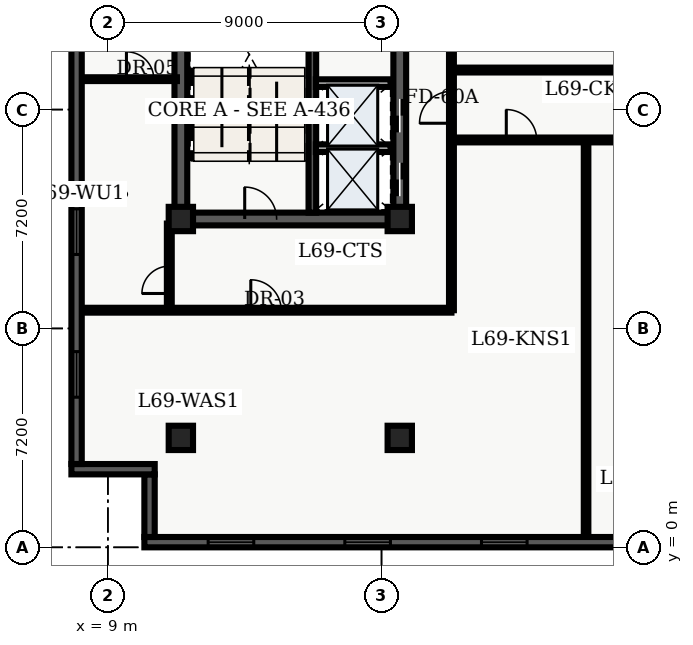
"""IFC4 building model, lengths in metres.
Left out: names, types, materials, properties, quantities, classifications, styles, units other than length and angle.
Written with IfcOpenShell. Run it as: python <this file> out.ifc"""

import sys

from ifc_helpers import new_model, entity, si_unit, converted_unit, direction, frame, origin_with_axes, origin_2d_with_axis, place, context, subcontext, project, spatial, polyline, rectangle, outline, extrude, element, fill, save


model = new_model("IFC4")
c1 = context("Model", 3, precision=1e-05, world=origin_with_axes(), true_north=direction((0.0, 1.0)))
c2 = subcontext(c1, "Body", "Model", "MODEL_VIEW")
j1 = project(units=[si_unit("LENGTHUNIT", "METRE"), converted_unit("PLANEANGLEUNIT", "DEGREE", entity("IfcPlaneAngleMeasure", 0.017), si_unit("PLANEANGLEUNIT", "RADIAN"), dimensions=[0, 0, 0, 0, 0, 0, 0])], contexts=[c1])
p1 = place(None, origin_with_axes())
s1 = spatial("IfcSite", under=j1, at=p1, CompositionType="ELEMENT")
p2 = place(p1, origin_with_axes())
s2 = spatial("IfcBuilding", under=s1, at=p2, CompositionType="ELEMENT")
p3 = place(p2, frame((0.0, 0.0, 280.2), z_axis=(0.0, 0.0, 1.0), x_axis=(1.0, 0.0, 0.0)))
s3 = spatial("IfcBuildingStorey", under=s2, at=p3, CompositionType="ELEMENT", Elevation=280.2)
p4 = place(p3, frame((11.4, 10.8, 0.0), z_axis=(0.0, 0.0, 1.0), x_axis=(0.0, 1.0, 0.0)))
e1 = element("IfcWall", 1, at=p4, inside=s3, PredefinedType="SHEAR", context=c2, shape_type="SweptSolid", body=[
    extrude(outline(polyline([(0.0, -0.21), (27.0, -0.21), (27.0, 0.21), (0.0, 0.21), (0.0, -0.21)])), origin_with_axes(), (0.0, 0.0, 1.0), 3.66),
])
p5 = place(p3, frame((11.4, 10.8, 0.0), z_axis=(0.0, 0.0, 1.0), x_axis=(1.0, 0.0, 0.0)))
e2 = element("IfcWall", 2, at=p5, inside=s3, PredefinedType="SHEAR", context=c2, shape_type="SweptSolid", body=[
    extrude(outline(polyline([(0.0, -0.21), (7.2, -0.21), (7.2, 0.21), (0.0, 0.21), (0.0, -0.21)])), origin_with_axes(), (0.0, 0.0, 1.0), 3.66),
])
p6 = place(p5, frame((2.625, 0.0, 0.0), z_axis=(0.0, 0.0, 1.0), x_axis=(1.0, 0.0, 0.0)))
e3 = element("IfcOpeningElement", 3, at=p6, cuts=e2, PredefinedType="OPENING", context=c2, shape_type="SweptSolid", body=[
    extrude(rectangle(XDim=1.05, YDim=0.44, at=origin_2d_with_axis()), origin_with_axes(), (0.0, 0.0, 1.0), 2.15),
])
p7 = place(p3, frame((18.6, 10.8, 0.0), z_axis=(0.0, 0.0, 1.0), x_axis=(0.0, 1.0, 0.0)))
e4 = element("IfcWall", 4, at=p7, inside=s3, PredefinedType="SHEAR", context=c2, shape_type="SweptSolid", body=[
    extrude(outline(polyline([(0.0, -0.21), (13.5, -0.21), (13.5, 0.21), (0.0, 0.21), (0.0, -0.21)])), origin_with_axes(), (0.0, 0.0, 1.0), 3.66),
])
p8 = place(p7, frame((1.3, 0.0, 0.0), z_axis=(0.0, 0.0, 1.0), x_axis=(1.0, 0.0, 0.0)))
e5 = element("IfcOpeningElement", 5, at=p8, cuts=e4, PredefinedType="OPENING", context=c2, shape_type="SweptSolid", body=[
    extrude(rectangle(XDim=1.1, YDim=0.44, at=origin_2d_with_axis()), origin_with_axes(), (0.0, 0.0, 1.0), 2.15),
])
p9 = place(p7, frame((3.4, 0.0, 0.0), z_axis=(0.0, 0.0, 1.0), x_axis=(1.0, 0.0, 0.0)))
e6 = element("IfcOpeningElement", 6, at=p9, cuts=e4, PredefinedType="OPENING", context=c2, shape_type="SweptSolid", body=[
    extrude(rectangle(XDim=1.1, YDim=0.44, at=origin_2d_with_axis()), origin_with_axes(), (0.0, 0.0, 1.0), 2.15),
])
p10 = place(p7, frame((11.125, 0.0, 0.0), z_axis=(0.0, 0.0, 1.0), x_axis=(1.0, 0.0, 0.0)))
e7 = element("IfcOpeningElement", 7, at=p10, cuts=e4, PredefinedType="OPENING", context=c2, shape_type="SweptSolid", body=[
    extrude(rectangle(XDim=1.05, YDim=0.44, at=origin_2d_with_axis()), origin_with_axes(), (0.0, 0.0, 1.0), 2.15),
])
p11 = place(p7, frame((6.675, 0.0, 0.0), z_axis=(0.0, 0.0, 1.0), x_axis=(1.0, 0.0, 0.0)))
e8 = element("IfcOpeningElement", 8, at=p11, cuts=e4, PredefinedType="OPENING", context=c2, shape_type="SweptSolid", body=[
    extrude(rectangle(XDim=0.95, YDim=0.44, at=origin_2d_with_axis()), origin_with_axes(), (0.0, 0.0, 1.0), 2.15),
])
p12 = place(p3, frame((15.725, 11.01, 0.0), z_axis=(0.0, 0.0, 1.0), x_axis=(0.0, 1.0, 0.0)))
e9 = element("IfcWall", 9, at=p12, inside=s3, PredefinedType="SHEAR", context=c2, shape_type="SweptSolid", body=[
    extrude(outline(polyline([(0.0, -0.125), (8.69, -0.125), (8.69, 0.125), (0.0, 0.125), (0.0, -0.125)])), origin_with_axes(), (0.0, 0.0, 1.0), 3.66),
])
for number, where, z_axis, x_axis in (
    (10, (11.4, 3.6, 0.0), (0.0, 0.0, 1.0), (1.0, 0.0, 0.0)),
    (11, (11.4, 10.8, 0.0), (0.0, 0.0, 1.0), (1.0, 0.0, 0.0)),
    (12, (18.6, 3.6, 0.0), (0.0, 0.0, 1.0), (1.0, 0.0, 0.0)),
    (13, (18.6, 10.8, 0.0), (0.0, 0.0, 1.0), (1.0, 0.0, 0.0)),
):
    element("IfcColumn", number, at=place(p3, frame(where, z_axis=z_axis, x_axis=x_axis)), inside=s3, PredefinedType="COLUMN", context=c2, shape_type="SweptSolid", body=[
        extrude(rectangle(XDim=0.8, YDim=0.8, at=origin_2d_with_axis()), origin_with_axes(), (0.0, 0.0, 1.0), 3.9),
    ])
for number, where, z_axis, x_axis in (
    (14, (15.84, 13.13, 0.0), (0.0, 0.0, 1.0), (1.0, 0.0, 0.0)),
    (15, (15.84, 15.27, 0.0), (0.0, 0.0, 1.0), (1.0, 0.0, 0.0)),
):
    element("IfcWall", number, at=place(p3, frame(where, z_axis=z_axis, x_axis=x_axis)), inside=s3, PredefinedType="SOLIDWALL", context=c2, shape_type="SweptSolid", body=[
        extrude(outline(polyline([(0.0, -0.125), (2.46, -0.125), (2.46, 0.125), (0.0, 0.125), (0.0, -0.125)])), origin_with_axes(), (0.0, 0.0, 1.0), 2.7),
    ])
p13 = place(p3, frame((8.135, 7.8, 0.0), z_axis=(0.0, 0.0, 1.0), x_axis=(1.0, 0.0, 0.0)))
e16 = element("IfcWall", 16, at=p13, inside=s3, PredefinedType="PARTITIONING", context=c2, shape_type="SweptSolid", body=[
    extrude(outline(polyline([(0.0, -0.08), (12.165, -0.08), (12.165, 0.08), (0.0, 0.08), (0.0, -0.08)])), origin_with_axes(), (0.0, 0.0, 1.0), 2.7),
])
p14 = place(p13, frame((6.065, 0.0, 0.0), z_axis=(0.0, 0.0, 1.0), x_axis=(1.0, 0.0, 0.0)))
e17 = element("IfcOpeningElement", 17, at=p14, cuts=e16, PredefinedType="OPENING", context=c2, shape_type="SweptSolid", body=[
    extrude(rectangle(XDim=1.0, YDim=0.18, at=origin_2d_with_axis()), origin_with_axes(), (0.0, 0.0, 1.0), 2.15),
])
p15 = place(p3, frame((20.3, 7.8, 0.0), z_axis=(0.0, 0.0, 1.0), x_axis=(0.0, 1.0, 0.0)))
e18 = element("IfcWall", 18, at=p15, inside=s3, PredefinedType="PARTITIONING", context=c2, shape_type="SweptSolid", body=[
    extrude(outline(polyline([(0.0, -0.08), (32.7, -0.08), (32.7, 0.08), (0.0, 0.08), (0.0, -0.08)])), origin_with_axes(), (0.0, 0.0, 1.0), 2.7),
])
p16 = place(p15, frame((14.2, 0.0, 0.0), z_axis=(0.0, 0.0, 1.0), x_axis=(1.0, 0.0, 0.0)))
e19 = element("IfcOpeningElement", 19, at=p16, cuts=e18, PredefinedType="OPENING", context=c2, shape_type="SweptSolid", body=[
    extrude(rectangle(XDim=1.0, YDim=0.18, at=origin_2d_with_axis()), origin_with_axes(), (0.0, 0.0, 1.0), 2.15),
])
p17 = place(p15, frame((18.24, 0.0, 0.0), z_axis=(0.0, 0.0, 1.0), x_axis=(1.0, 0.0, 0.0)))
e20 = element("IfcOpeningElement", 20, at=p17, cuts=e18, PredefinedType="OPENING", context=c2, shape_type="SweptSolid", body=[
    extrude(rectangle(XDim=1.0, YDim=0.18, at=origin_2d_with_axis()), origin_with_axes(), (0.0, 0.0, 1.0), 2.15),
])
p18 = place(p15, frame((22.011, 0.0, 0.0), z_axis=(0.0, 0.0, 1.0), x_axis=(1.0, 0.0, 0.0)))
e21 = element("IfcOpeningElement", 21, at=p18, cuts=e18, PredefinedType="OPENING", context=c2, shape_type="SweptSolid", body=[
    extrude(rectangle(XDim=1.0, YDim=0.18, at=origin_2d_with_axis()), origin_with_axes(), (0.0, 0.0, 1.0), 2.15),
])
p19 = place(p15, frame((25.672, 0.0, 0.0), z_axis=(0.0, 0.0, 1.0), x_axis=(1.0, 0.0, 0.0)))
e22 = element("IfcOpeningElement", 22, at=p19, cuts=e18, PredefinedType="OPENING", context=c2, shape_type="SweptSolid", body=[
    extrude(rectangle(XDim=1.0, YDim=0.18, at=origin_2d_with_axis()), origin_with_axes(), (0.0, 0.0, 1.0), 2.15),
])
p20 = place(p15, frame((6.675, 0.0, 0.0), z_axis=(0.0, 0.0, 1.0), x_axis=(1.0, 0.0, 0.0)))
e23 = element("IfcOpeningElement", 23, at=p20, cuts=e18, PredefinedType="OPENING", context=c2, shape_type="SweptSolid", body=[
    extrude(rectangle(XDim=1.05, YDim=0.18, at=origin_2d_with_axis()), origin_with_axes(), (0.0, 0.0, 1.0), 2.15),
])
p21 = place(p3, frame((11.02, 7.8, 0.0), z_axis=(0.0, 0.0, 1.0), x_axis=(0.0, 1.0, 0.0)))
e24 = element("IfcWall", 24, at=p21, inside=s3, PredefinedType="PARTITIONING", context=c2, shape_type="SweptSolid", body=[
    extrude(outline(polyline([(0.0, -0.08), (2.85, -0.08), (2.85, 0.08), (0.0, 0.08), (0.0, -0.08)])), origin_with_axes(), (0.0, 0.0, 1.0), 2.7),
])
p22 = place(p21, frame((1.0, 0.0, 0.0), z_axis=(0.0, 0.0, 1.0), x_axis=(1.0, 0.0, 0.0)))
e25 = element("IfcOpeningElement", 25, at=p22, cuts=e24, PredefinedType="OPENING", context=c2, shape_type="SweptSolid", body=[
    extrude(rectangle(XDim=0.9, YDim=0.18, at=origin_2d_with_axis()), origin_with_axes(), (0.0, 0.0, 1.0), 2.15),
])
p23 = place(p3, frame((8.135, 15.4, 0.0), z_axis=(0.0, 0.0, 1.0), x_axis=(1.0, 0.0, 0.0)))
e26 = element("IfcWall", 26, at=p23, inside=s3, PredefinedType="PARTITIONING", context=c2, shape_type="SweptSolid", body=[
    extrude(outline(polyline([(0.0, -0.062), (3.135, -0.062), (3.135, 0.062), (0.0, 0.062), (0.0, -0.062)])), origin_with_axes(), (0.0, 0.0, 1.0), 2.7),
])
p24 = place(p23, frame((1.925, 0.0, 0.0), z_axis=(0.0, 0.0, 1.0), x_axis=(1.0, 0.0, 0.0)))
e27 = element("IfcOpeningElement", 27, at=p24, cuts=e26, PredefinedType="OPENING", context=c2, shape_type="SweptSolid", body=[
    extrude(rectangle(XDim=0.9, YDim=0.145, at=origin_2d_with_axis()), origin_with_axes(), (0.0, 0.0, 1.0), 2.15),
])
p25 = place(p3, frame((20.3, 13.4, 0.0), z_axis=(0.0, 0.0, 1.0), x_axis=(1.0, 0.0, 0.0)))
e28 = element("IfcWall", 28, at=p25, inside=s3, PredefinedType="PARTITIONING", context=c2, shape_type="SweptSolid", body=[
    extrude(outline(polyline([(0.0, -0.08), (15.45, -0.08), (15.45, 0.08), (0.0, 0.08), (0.0, -0.08)])), origin_with_axes(), (0.0, 0.0, 1.0), 2.7),
])
p26 = place(p25, frame((2.304, 0.0, 0.0), z_axis=(0.0, 0.0, 1.0), x_axis=(1.0, 0.0, 0.0)))
e29 = element("IfcOpeningElement", 29, at=p26, cuts=e28, PredefinedType="OPENING", context=c2, shape_type="SweptSolid", body=[
    extrude(rectangle(XDim=1.0, YDim=0.18, at=origin_2d_with_axis()), origin_with_axes(), (0.0, 0.0, 1.0), 2.15),
])
p27 = place(p25, frame((6.866, 0.0, 0.0), z_axis=(0.0, 0.0, 1.0), x_axis=(1.0, 0.0, 0.0)))
e30 = element("IfcOpeningElement", 30, at=p27, cuts=e28, PredefinedType="OPENING", context=c2, shape_type="SweptSolid", body=[
    extrude(rectangle(XDim=1.0, YDim=0.18, at=origin_2d_with_axis()), origin_with_axes(), (0.0, 0.0, 1.0), 2.15),
])
p28 = place(p25, frame((12.337, 0.0, 0.0), z_axis=(0.0, 0.0, 1.0), x_axis=(1.0, 0.0, 0.0)))
e31 = element("IfcOpeningElement", 31, at=p28, cuts=e28, PredefinedType="OPENING", context=c2, shape_type="SweptSolid", body=[
    extrude(rectangle(XDim=1.2, YDim=0.18, at=origin_2d_with_axis()), origin_with_axes(), (0.0, 0.0, 1.0), 2.2),
])
p29 = place(p3, frame((20.3, 15.7, 0.0), z_axis=(0.0, 0.0, 1.0), x_axis=(1.0, 0.0, 0.0)))
e32 = element("IfcWall", 32, at=p29, inside=s3, PredefinedType="PARTITIONING", context=c2, shape_type="SweptSolid", body=[
    extrude(outline(polyline([(0.0, -0.08), (15.45, -0.08), (15.45, 0.08), (0.0, 0.08), (0.0, -0.08)])), origin_with_axes(), (0.0, 0.0, 1.0), 2.7),
])
p30 = place(p29, frame((7.775, 0.0, 0.0), z_axis=(0.0, 0.0, 1.0), x_axis=(1.0, 0.0, 0.0)))
e33 = element("IfcOpeningElement", 33, at=p30, cuts=e32, PredefinedType="OPENING", context=c2, shape_type="SweptSolid", body=[
    extrude(rectangle(XDim=1.0, YDim=0.18, at=origin_2d_with_axis()), origin_with_axes(), (0.0, 0.0, 1.0), 2.15),
])
p31 = place(p3, frame((24.728, 0.335, 0.0), z_axis=(0.0, 0.0, 1.0), x_axis=(0.0, 1.0, 0.0)))
e34 = element("IfcWall", 34, at=p31, inside=s3, PredefinedType="PARTITIONING", context=c2, shape_type="SweptSolid", body=[
    extrude(outline(polyline([(0.0, -0.075), (12.945, -0.075), (12.945, 0.075), (0.0, 0.075), (0.0, -0.075)])), origin_with_axes(), (0.0, 0.0, 1.0), 2.7),
])
p32 = place(p3, frame((47.36, 0.17, 0.0), z_axis=(0.0, 0.0, 1.0), x_axis=(-1.0, 0.0, 0.0)))
e35 = element("IfcWall", 35, at=p32, inside=s3, PredefinedType="SOLIDWALL", context=c2, shape_type="SweptSolid", body=[
    extrude(outline(polyline([(0.0, -0.17), (37.16, -0.17), (37.16, 0.17), (0.0, 0.17), (0.0, -0.17)])), origin_with_axes(), (0.0, 0.0, 1.0), 3.66),
])
p33 = place(p32, frame((2.847, 0.0, 0.45), z_axis=(0.0, 0.0, 1.0), x_axis=(1.0, 0.0, 0.0)))
e36 = element("IfcOpeningElement", 36, at=p33, cuts=e35, PredefinedType="OPENING", context=c2, shape_type="SweptSolid", body=[
    extrude(rectangle(XDim=1.5, YDim=0.36, at=origin_2d_with_axis()), origin_with_axes(), (0.0, 0.0, 1.0), 2.1),
])
p34 = place(p32, frame((7.342, 0.0, 0.45), z_axis=(0.0, 0.0, 1.0), x_axis=(1.0, 0.0, 0.0)))
e37 = element("IfcOpeningElement", 37, at=p34, cuts=e35, PredefinedType="OPENING", context=c2, shape_type="SweptSolid", body=[
    extrude(rectangle(XDim=1.5, YDim=0.36, at=origin_2d_with_axis()), origin_with_axes(), (0.0, 0.0, 1.0), 2.1),
])
p35 = place(p32, frame((11.837, 0.0, 0.45), z_axis=(0.0, 0.0, 1.0), x_axis=(1.0, 0.0, 0.0)))
e38 = element("IfcOpeningElement", 38, at=p35, cuts=e35, PredefinedType="OPENING", context=c2, shape_type="SweptSolid", body=[
    extrude(rectangle(XDim=1.5, YDim=0.36, at=origin_2d_with_axis()), origin_with_axes(), (0.0, 0.0, 1.0), 2.1),
])
p36 = place(p32, frame((16.332, 0.0, 0.45), z_axis=(0.0, 0.0, 1.0), x_axis=(1.0, 0.0, 0.0)))
e39 = element("IfcOpeningElement", 39, at=p36, cuts=e35, PredefinedType="OPENING", context=c2, shape_type="SweptSolid", body=[
    extrude(rectangle(XDim=1.5, YDim=0.36, at=origin_2d_with_axis()), origin_with_axes(), (0.0, 0.0, 1.0), 2.1),
])
p37 = place(p32, frame((20.827, 0.0, 0.45), z_axis=(0.0, 0.0, 1.0), x_axis=(1.0, 0.0, 0.0)))
e40 = element("IfcOpeningElement", 40, at=p37, cuts=e35, PredefinedType="OPENING", context=c2, shape_type="SweptSolid", body=[
    extrude(rectangle(XDim=1.5, YDim=0.36, at=origin_2d_with_axis()), origin_with_axes(), (0.0, 0.0, 1.0), 2.1),
])
p38 = place(p32, frame((25.322, 0.0, 0.45), z_axis=(0.0, 0.0, 1.0), x_axis=(1.0, 0.0, 0.0)))
e41 = element("IfcOpeningElement", 41, at=p38, cuts=e35, PredefinedType="OPENING", context=c2, shape_type="SweptSolid", body=[
    extrude(rectangle(XDim=1.5, YDim=0.36, at=origin_2d_with_axis()), origin_with_axes(), (0.0, 0.0, 1.0), 2.1),
])
p39 = place(p32, frame((29.817, 0.0, 0.45), z_axis=(0.0, 0.0, 1.0), x_axis=(1.0, 0.0, 0.0)))
e42 = element("IfcOpeningElement", 42, at=p39, cuts=e35, PredefinedType="OPENING", context=c2, shape_type="SweptSolid", body=[
    extrude(rectangle(XDim=1.5, YDim=0.36, at=origin_2d_with_axis()), origin_with_axes(), (0.0, 0.0, 1.0), 2.1),
])
p40 = place(p32, frame((34.312, 0.0, 0.45), z_axis=(0.0, 0.0, 1.0), x_axis=(1.0, 0.0, 0.0)))
e43 = element("IfcOpeningElement", 43, at=p40, cuts=e35, PredefinedType="OPENING", context=c2, shape_type="SweptSolid", body=[
    extrude(rectangle(XDim=1.5, YDim=0.36, at=origin_2d_with_axis()), origin_with_axes(), (0.0, 0.0, 1.0), 2.1),
])
p41 = place(p3, frame((10.37, 0.34, 0.0), z_axis=(0.0, 0.0, 1.0), x_axis=(0.0, 1.0, 0.0)))
e44 = element("IfcWall", 44, at=p41, inside=s3, PredefinedType="SOLIDWALL", context=c2, shape_type="SweptSolid", body=[
    extrude(outline(polyline([(0.0, -0.17), (2.06, -0.17), (2.06, 0.17), (0.0, 0.17), (0.0, -0.17)])), origin_with_axes(), (0.0, 0.0, 1.0), 3.66),
])
p42 = place(p3, frame((10.54, 2.57, 0.0), z_axis=(0.0, 0.0, 1.0), x_axis=(-1.0, 0.0, 0.0)))
e45 = element("IfcWall", 45, at=p42, inside=s3, PredefinedType="SOLIDWALL", context=c2, shape_type="SweptSolid", body=[
    extrude(outline(polyline([(0.0, -0.17), (2.74, -0.17), (2.74, 0.17), (0.0, 0.17), (0.0, -0.17)])), origin_with_axes(), (0.0, 0.0, 1.0), 3.66),
])
p43 = place(p3, frame((7.97, 2.74, 0.0), z_axis=(0.0, 0.0, 1.0), x_axis=(0.0, 1.0, 0.0)))
e46 = element("IfcWall", 46, at=p43, inside=s3, PredefinedType="SOLIDWALL", context=c2, shape_type="SweptSolid", body=[
    extrude(outline(polyline([(0.0, -0.17), (43.46, -0.17), (43.46, 0.17), (0.0, 0.17), (0.0, -0.17)])), origin_with_axes(), (0.0, 0.0, 1.0), 3.66),
])
p44 = place(p43, frame((2.948, 0.0, 0.45), z_axis=(0.0, 0.0, 1.0), x_axis=(1.0, 0.0, 0.0)))
e47 = element("IfcOpeningElement", 47, at=p44, cuts=e46, PredefinedType="OPENING", context=c2, shape_type="SweptSolid", body=[
    extrude(rectangle(XDim=1.5, YDim=0.36, at=origin_2d_with_axis()), origin_with_axes(), (0.0, 0.0, 1.0), 2.1),
])
p45 = place(p43, frame((7.643, 0.0, 0.45), z_axis=(0.0, 0.0, 1.0), x_axis=(1.0, 0.0, 0.0)))
e48 = element("IfcOpeningElement", 48, at=p45, cuts=e46, PredefinedType="OPENING", context=c2, shape_type="SweptSolid", body=[
    extrude(rectangle(XDim=1.5, YDim=0.36, at=origin_2d_with_axis()), origin_with_axes(), (0.0, 0.0, 1.0), 2.1),
])
p46 = place(p43, frame((17.034, 0.0, 0.45), z_axis=(0.0, 0.0, 1.0), x_axis=(1.0, 0.0, 0.0)))
e49 = element("IfcOpeningElement", 49, at=p46, cuts=e46, PredefinedType="OPENING", context=c2, shape_type="SweptSolid", body=[
    extrude(rectangle(XDim=1.5, YDim=0.36, at=origin_2d_with_axis()), origin_with_axes(), (0.0, 0.0, 1.0), 2.1),
])
p47 = place(p43, frame((26.426, 0.0, 0.45), z_axis=(0.0, 0.0, 1.0), x_axis=(1.0, 0.0, 0.0)))
e50 = element("IfcOpeningElement", 50, at=p47, cuts=e46, PredefinedType="OPENING", context=c2, shape_type="SweptSolid", body=[
    extrude(rectangle(XDim=1.5, YDim=0.36, at=origin_2d_with_axis()), origin_with_axes(), (0.0, 0.0, 1.0), 2.1),
])
p48 = place(p43, frame((31.571, 0.0, 0.45), z_axis=(0.0, 0.0, 1.0), x_axis=(1.0, 0.0, 0.0)))
e51 = element("IfcOpeningElement", 51, at=p48, cuts=e46, PredefinedType="OPENING", context=c2, shape_type="SweptSolid", body=[
    extrude(rectangle(XDim=1.5, YDim=0.36, at=origin_2d_with_axis()), origin_with_axes(), (0.0, 0.0, 1.0), 2.1),
])
p49 = place(p43, frame((35.817, 0.0, 0.45), z_axis=(0.0, 0.0, 1.0), x_axis=(1.0, 0.0, 0.0)))
e52 = element("IfcOpeningElement", 52, at=p49, cuts=e46, PredefinedType="OPENING", context=c2, shape_type="SweptSolid", body=[
    extrude(rectangle(XDim=1.5, YDim=0.36, at=origin_2d_with_axis()), origin_with_axes(), (0.0, 0.0, 1.0), 2.1),
])
p50 = place(p43, frame((40.512, 0.0, 0.45), z_axis=(0.0, 0.0, 1.0), x_axis=(1.0, 0.0, 0.0)))
e53 = element("IfcOpeningElement", 53, at=p50, cuts=e46, PredefinedType="OPENING", context=c2, shape_type="SweptSolid", body=[
    extrude(rectangle(XDim=1.5, YDim=0.36, at=origin_2d_with_axis()), origin_with_axes(), (0.0, 0.0, 1.0), 2.1),
])
p51 = place(p7, frame((1.3, 0.0, 0.0), z_axis=(0.0, 0.0, 1.0), x_axis=(1.0, 0.0, 0.0)))
e54 = element("IfcDoor", 54, at=p51, inside=s3, OperationType="SLIDING_TO_LEFT", PredefinedType="DOOR", context=c2, shape_type="SweptSolid", body=[
    extrude(rectangle(XDim=1.1, YDim=0.09, at=origin_2d_with_axis()), origin_with_axes(), (0.0, 0.0, 1.0), 2.15),
])
fill(e5, e54)
p52 = place(p7, frame((3.4, 0.0, 0.0), z_axis=(0.0, 0.0, 1.0), x_axis=(1.0, 0.0, 0.0)))
e55 = element("IfcDoor", 55, at=p52, inside=s3, OperationType="SLIDING_TO_RIGHT", PredefinedType="DOOR", context=c2, shape_type="SweptSolid", body=[
    extrude(rectangle(XDim=1.1, YDim=0.09, at=origin_2d_with_axis()), origin_with_axes(), (0.0, 0.0, 1.0), 2.15),
])
fill(e6, e55)
p53 = place(p5, frame((2.625, 0.0, 0.0), z_axis=(0.0, 0.0, 1.0), x_axis=(1.0, 0.0, 0.0)))
e56 = element("IfcDoor", 56, at=p53, inside=s3, OperationType="SINGLE_SWING_LEFT", PredefinedType="DOOR", context=c2, shape_type="SweptSolid", body=[
    extrude(rectangle(XDim=1.05, YDim=0.09, at=origin_2d_with_axis()), origin_with_axes(), (0.0, 0.0, 1.0), 2.15),
])
fill(e3, e56)
p54 = place(p23, frame((1.925, 0.0, 0.0), z_axis=(0.0, 0.0, 1.0), x_axis=(1.0, 0.0, 0.0)))
e57 = element("IfcDoor", 57, at=p54, inside=s3, OperationType="SINGLE_SWING_LEFT", PredefinedType="DOOR", context=c2, shape_type="SweptSolid", body=[
    extrude(rectangle(XDim=0.9, YDim=0.075, at=origin_2d_with_axis()), origin_with_axes(), (0.0, 0.0, 1.0), 2.15),
])
fill(e27, e57)
p55 = place(p21, frame((1.0, 0.0, 0.0), z_axis=(0.0, 0.0, 1.0), x_axis=(1.0, 0.0, 0.0)))
e58 = element("IfcDoor", 58, at=p55, inside=s3, OperationType="SINGLE_SWING_LEFT", PredefinedType="DOOR", context=c2, shape_type="SweptSolid", body=[
    extrude(rectangle(XDim=0.9, YDim=0.09, at=origin_2d_with_axis()), origin_with_axes(), (0.0, 0.0, 1.0), 2.15),
])
fill(e25, e58)
p56 = place(p13, frame((6.065, 0.0, 0.0), z_axis=(0.0, 0.0, 1.0), x_axis=(1.0, 0.0, 0.0)))
e59 = element("IfcDoor", 59, at=p56, inside=s3, OperationType="SINGLE_SWING_LEFT", PredefinedType="DOOR", context=c2, shape_type="SweptSolid", body=[
    extrude(rectangle(XDim=1.0, YDim=0.09, at=origin_2d_with_axis()), origin_with_axes(), (0.0, 0.0, 1.0), 2.15),
])
fill(e17, e59)
p57 = place(p15, frame((6.675, 0.0, 0.0), z_axis=(0.0, 0.0, 1.0), x_axis=(1.0, 0.0, 0.0)))
e60 = element("IfcDoor", 60, at=p57, inside=s3, OperationType="SINGLE_SWING_LEFT", PredefinedType="DOOR", context=c2, shape_type="SweptSolid", body=[
    extrude(rectangle(XDim=1.05, YDim=0.09, at=origin_2d_with_axis()), origin_with_axes(), (0.0, 0.0, 1.0), 2.15),
])
fill(e23, e60)
p58 = place(p25, frame((2.304, 0.0, 0.0), z_axis=(0.0, 0.0, 1.0), x_axis=(1.0, 0.0, 0.0)))
e61 = element("IfcDoor", 61, at=p58, inside=s3, OperationType="SINGLE_SWING_LEFT", PredefinedType="DOOR", context=c2, shape_type="SweptSolid", body=[
    extrude(rectangle(XDim=1.0, YDim=0.09, at=origin_2d_with_axis()), origin_with_axes(), (0.0, 0.0, 1.0), 2.15),
])
fill(e29, e61)
p59 = place(p32, frame((25.322, 0.0, 0.45), z_axis=(0.0, 0.0, 1.0), x_axis=(1.0, 0.0, 0.0)))
e62 = element("IfcWindow", 62, at=p59, inside=s3, PredefinedType="WINDOW", context=c2, shape_type="SweptSolid", body=[
    extrude(rectangle(XDim=1.5, YDim=0.09, at=origin_2d_with_axis()), origin_with_axes(), (0.0, 0.0, 1.0), 2.1),
])
fill(e41, e62)
p60 = place(p32, frame((29.817, 0.0, 0.45), z_axis=(0.0, 0.0, 1.0), x_axis=(1.0, 0.0, 0.0)))
e63 = element("IfcWindow", 63, at=p60, inside=s3, PredefinedType="WINDOW", context=c2, shape_type="SweptSolid", body=[
    extrude(rectangle(XDim=1.5, YDim=0.09, at=origin_2d_with_axis()), origin_with_axes(), (0.0, 0.0, 1.0), 2.1),
])
fill(e42, e63)
p61 = place(p32, frame((34.312, 0.0, 0.45), z_axis=(0.0, 0.0, 1.0), x_axis=(1.0, 0.0, 0.0)))
e64 = element("IfcWindow", 64, at=p61, inside=s3, PredefinedType="WINDOW", context=c2, shape_type="SweptSolid", body=[
    extrude(rectangle(XDim=1.5, YDim=0.09, at=origin_2d_with_axis()), origin_with_axes(), (0.0, 0.0, 1.0), 2.1),
])
fill(e43, e64)
p62 = place(p43, frame((2.948, 0.0, 0.45), z_axis=(0.0, 0.0, 1.0), x_axis=(1.0, 0.0, 0.0)))
e65 = element("IfcWindow", 65, at=p62, inside=s3, PredefinedType="WINDOW", context=c2, shape_type="SweptSolid", body=[
    extrude(rectangle(XDim=1.5, YDim=0.09, at=origin_2d_with_axis()), origin_with_axes(), (0.0, 0.0, 1.0), 2.1),
])
fill(e47, e65)
p63 = place(p43, frame((7.643, 0.0, 0.45), z_axis=(0.0, 0.0, 1.0), x_axis=(1.0, 0.0, 0.0)))
e66 = element("IfcWindow", 66, at=p63, inside=s3, PredefinedType="WINDOW", context=c2, shape_type="SweptSolid", body=[
    extrude(rectangle(XDim=1.5, YDim=0.09, at=origin_2d_with_axis()), origin_with_axes(), (0.0, 0.0, 1.0), 2.1),
])
fill(e48, e66)
save(model, sys.argv[1])
